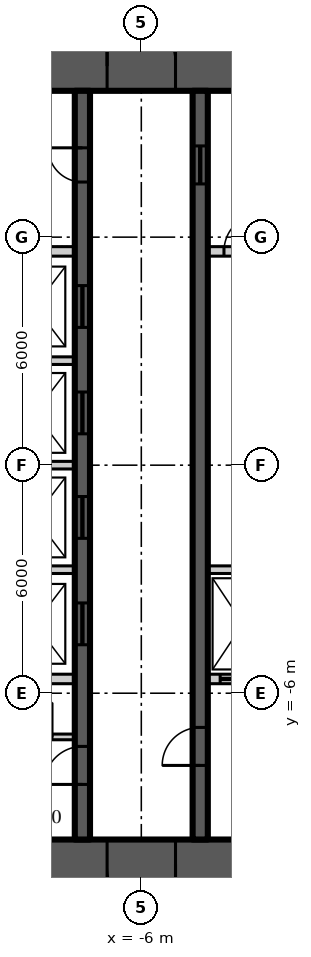
"""IFC4 building model, lengths in metres.
Left out: names, types, materials, properties, quantities, classifications, styles, units other than length and angle.
Written with IfcOpenShell. Run it as: python <this file> out.ifc"""

import sys

from ifc_helpers import new_model, si_unit, direction, frame, frame_2d, origin, place, context, subcontext, project, spatial, rectangle, extrude, element, fill, save


model = new_model("IFC4")
c1 = context("Model", 3, precision=1e-05, world=origin(), true_north=direction((0.0, 1.0)))
c2 = subcontext(c1, "Body", "Model", "MODEL_VIEW")
j1 = project(units=[si_unit("LENGTHUNIT", "METRE"), si_unit("PLANEANGLEUNIT", "RADIAN")], contexts=[c1])
p1 = place(None, origin())
s1 = spatial("IfcSite", under=j1, at=p1, CompositionType="ELEMENT")
p2 = place(p1, origin())
s2 = spatial("IfcBuilding", under=s1, at=p2, CompositionType="ELEMENT")
p3 = place(p2, frame((0.0, 0.0, 86.4)))
s3 = spatial("IfcBuildingStorey", under=s2, at=p3, CompositionType="ELEMENT", Elevation=86.4)
p4 = place(p3, frame((-11.15, 10.5, 0.0), z_axis=(0.0, 0.0, 1.0), x_axis=(1.0, 0.0, 0.0)))
e1 = element("IfcWall", 1, at=p4, inside=s3, PredefinedType="SHEAR", context=c2, shape_type="SweptSolid", body=[
    extrude(rectangle(XDim=22.3, YDim=1.3, at=frame_2d((11.15, 0.0))), origin(), (0.0, 0.0, 1.0), 3.9),
])
p5 = place(p4, frame((4.25, 0.0, 0.0)))
e2 = element("IfcOpeningElement", 2, at=p5, cuts=e1, PredefinedType="OPENING", context=c2, shape_type="SweptSolid", body=[
    extrude(rectangle(XDim=1.8, YDim=2.2, at=frame_2d((0.9, 1.1))), frame((0.0, 0.66, 0.0), z_axis=(0.0, -1.0, 0.0), x_axis=(1.0, 0.0, 0.0)), (0.0, 0.0, 1.0), 1.32),
])
p6 = place(p4, frame((16.25, 0.0, 0.0)))
e3 = element("IfcOpeningElement", 3, at=p6, cuts=e1, PredefinedType="OPENING", context=c2, shape_type="SweptSolid", body=[
    extrude(rectangle(XDim=1.8, YDim=2.2, at=frame_2d((0.9, 1.1))), frame((0.0, 0.66, 0.0), z_axis=(0.0, -1.0, 0.0), x_axis=(1.0, 0.0, 0.0)), (0.0, 0.0, 1.0), 1.32),
])
p7 = place(p3, frame((11.15, -10.5, 0.0), z_axis=(0.0, 0.0, 1.0), x_axis=(-1.0, 0.0, 0.0)))
e4 = element("IfcWall", 4, at=p7, inside=s3, PredefinedType="SHEAR", context=c2, shape_type="SweptSolid", body=[
    extrude(rectangle(XDim=22.3, YDim=1.3, at=frame_2d((11.15, 0.0))), origin(), (0.0, 0.0, 1.0), 3.9),
])
p8 = place(p7, frame((16.25, 0.0, 0.0)))
e5 = element("IfcOpeningElement", 5, at=p8, cuts=e4, PredefinedType="OPENING", context=c2, shape_type="SweptSolid", body=[
    extrude(rectangle(XDim=1.8, YDim=2.2, at=frame_2d((0.9, 1.1))), frame((0.0, 0.66, 0.0), z_axis=(0.0, -1.0, 0.0), x_axis=(1.0, 0.0, 0.0)), (0.0, 0.0, 1.0), 1.32),
])
p9 = place(p7, frame((4.25, 0.0, 0.0)))
e6 = element("IfcOpeningElement", 6, at=p9, cuts=e4, PredefinedType="OPENING", context=c2, shape_type="SweptSolid", body=[
    extrude(rectangle(XDim=1.8, YDim=2.2, at=frame_2d((0.9, 1.1))), frame((0.0, 0.66, 0.0), z_axis=(0.0, -1.0, 0.0), x_axis=(1.0, 0.0, 0.0)), (0.0, 0.0, 1.0), 1.32),
])
p10 = place(p3, frame((-7.55, -9.85, 0.0), z_axis=(0.0, 0.0, 1.0), x_axis=(0.0, 1.0, 0.0)))
e7 = element("IfcWall", 7, at=p10, inside=s3, PredefinedType="SHEAR", context=c2, shape_type="SweptSolid", body=[
    extrude(rectangle(XDim=19.7, YDim=0.4, at=frame_2d((9.85, 0.0))), origin(), (0.0, 0.0, 1.0), 3.9),
])
p11 = place(p10, frame((1.45, 0.0, 0.0)))
e8 = element("IfcOpeningElement", 8, at=p11, cuts=e7, PredefinedType="OPENING", context=c2, shape_type="SweptSolid", body=[
    extrude(rectangle(XDim=1.0, YDim=2.2, at=frame_2d((0.5, 1.1))), frame((0.0, 0.21, 0.0), z_axis=(0.0, -1.0, 0.0), x_axis=(1.0, 0.0, 0.0)), (0.0, 0.0, 1.0), 0.42),
])
p12 = place(p10, frame((17.3, 0.0, 0.0)))
e9 = element("IfcOpeningElement", 9, at=p12, cuts=e7, PredefinedType="OPENING", context=c2, shape_type="SweptSolid", body=[
    extrude(rectangle(XDim=0.9, YDim=2.1, at=frame_2d((0.45, 1.05))), frame((0.0, 0.21, 0.0), z_axis=(0.0, -1.0, 0.0), x_axis=(1.0, 0.0, 0.0)), (0.0, 0.0, 1.0), 0.42),
])
p13 = place(p10, frame((5.125, 0.0, 0.0)))
e10 = element("IfcOpeningElement", 10, at=p13, cuts=e7, PredefinedType="OPENING", context=c2, shape_type="SweptSolid", body=[
    extrude(rectangle(XDim=1.1, YDim=2.2, at=frame_2d((0.55, 1.1))), frame((0.0, 0.21, 0.0), z_axis=(0.0, -1.0, 0.0), x_axis=(1.0, 0.0, 0.0)), (0.0, 0.0, 1.0), 0.42),
])
p14 = place(p10, frame((7.925, 0.0, 0.0)))
e11 = element("IfcOpeningElement", 11, at=p14, cuts=e7, PredefinedType="OPENING", context=c2, shape_type="SweptSolid", body=[
    extrude(rectangle(XDim=1.1, YDim=2.2, at=frame_2d((0.55, 1.1))), frame((0.0, 0.21, 0.0), z_axis=(0.0, -1.0, 0.0), x_axis=(1.0, 0.0, 0.0)), (0.0, 0.0, 1.0), 0.42),
])
p15 = place(p10, frame((10.675, 0.0, 0.0)))
e12 = element("IfcOpeningElement", 12, at=p15, cuts=e7, PredefinedType="OPENING", context=c2, shape_type="SweptSolid", body=[
    extrude(rectangle(XDim=1.1, YDim=2.2, at=frame_2d((0.55, 1.1))), frame((0.0, 0.21, 0.0), z_axis=(0.0, -1.0, 0.0), x_axis=(1.0, 0.0, 0.0)), (0.0, 0.0, 1.0), 0.42),
])
p16 = place(p10, frame((13.475, 0.0, 0.0)))
e13 = element("IfcOpeningElement", 13, at=p16, cuts=e7, PredefinedType="OPENING", context=c2, shape_type="SweptSolid", body=[
    extrude(rectangle(XDim=1.1, YDim=2.2, at=frame_2d((0.55, 1.1))), frame((0.0, 0.21, 0.0), z_axis=(0.0, -1.0, 0.0), x_axis=(1.0, 0.0, 0.0)), (0.0, 0.0, 1.0), 0.42),
])
p17 = place(p3, frame((-4.45, -9.85, 0.0), z_axis=(0.0, 0.0, 1.0), x_axis=(0.0, 1.0, 0.0)))
e14 = element("IfcWall", 14, at=p17, inside=s3, PredefinedType="SHEAR", context=c2, shape_type="SweptSolid", body=[
    extrude(rectangle(XDim=19.7, YDim=0.4, at=frame_2d((9.85, 0.0))), origin(), (0.0, 0.0, 1.0), 3.9),
])
p18 = place(p17, frame((1.95, 0.0, 0.0)))
e15 = element("IfcOpeningElement", 15, at=p18, cuts=e14, PredefinedType="OPENING", context=c2, shape_type="SweptSolid", body=[
    extrude(rectangle(XDim=1.0, YDim=2.2, at=frame_2d((0.5, 1.1))), frame((0.0, 0.21, 0.0), z_axis=(0.0, -1.0, 0.0), x_axis=(1.0, 0.0, 0.0)), (0.0, 0.0, 1.0), 0.42),
])
p19 = place(p17, frame((17.25, 0.0, 0.0)))
e16 = element("IfcOpeningElement", 16, at=p19, cuts=e14, PredefinedType="OPENING", context=c2, shape_type="SweptSolid", body=[
    extrude(rectangle(XDim=1.0, YDim=2.1, at=frame_2d((0.5, 1.05))), frame((0.0, 0.21, 0.0), z_axis=(0.0, -1.0, 0.0), x_axis=(1.0, 0.0, 0.0)), (0.0, 0.0, 1.0), 0.42),
])
p20 = place(p3, frame((-9.85, 5.625, 0.0), z_axis=(0.0, 0.0, 1.0), x_axis=(1.0, 0.0, 0.0)))
e17 = element("IfcWall", 17, at=p20, inside=s3, PredefinedType="SOLIDWALL", context=c2, shape_type="SweptSolid", body=[
    extrude(rectangle(XDim=2.1, YDim=0.25, at=frame_2d((1.05, 0.0))), origin(), (0.0, 0.0, 1.0), 3.7),
])
p21 = place(p3, frame((-4.25, 5.625, 0.0), z_axis=(0.0, 0.0, 1.0), x_axis=(1.0, 0.0, 0.0)))
e18 = element("IfcWall", 18, at=p21, inside=s3, PredefinedType="SOLIDWALL", context=c2, shape_type="SweptSolid", body=[
    extrude(rectangle(XDim=1.85, YDim=0.25, at=frame_2d((0.925, 0.0))), origin(), (0.0, 0.0, 1.0), 3.7),
])
p22 = place(p21, frame((0.425, 0.0, 0.0)))
e19 = element("IfcOpeningElement", 19, at=p22, cuts=e18, PredefinedType="OPENING", context=c2, shape_type="SweptSolid", body=[
    extrude(rectangle(XDim=1.0, YDim=2.2, at=frame_2d((0.5, 1.1))), frame((0.0, 0.135, 0.0), z_axis=(0.0, -1.0, 0.0), x_axis=(1.0, 0.0, 0.0)), (0.0, 0.0, 1.0), 0.27),
])
p23 = place(p3, frame((-9.85, -5.625, 0.0), z_axis=(0.0, 0.0, 1.0), x_axis=(1.0, 0.0, 0.0)))
e20 = element("IfcWall", 20, at=p23, inside=s3, PredefinedType="SOLIDWALL", context=c2, shape_type="SweptSolid", body=[
    extrude(rectangle(XDim=2.1, YDim=0.25, at=frame_2d((1.05, 0.0))), origin(), (0.0, 0.0, 1.0), 3.7),
])
p24 = place(p3, frame((-4.25, -5.625, 0.0), z_axis=(0.0, 0.0, 1.0), x_axis=(1.0, 0.0, 0.0)))
e21 = element("IfcWall", 21, at=p24, inside=s3, PredefinedType="SOLIDWALL", context=c2, shape_type="SweptSolid", body=[
    extrude(rectangle(XDim=1.85, YDim=0.25, at=frame_2d((0.925, 0.0))), origin(), (0.0, 0.0, 1.0), 3.7),
])
p25 = place(p24, frame((0.325, 0.0, 0.0)))
e22 = element("IfcOpeningElement", 22, at=p25, cuts=e21, PredefinedType="OPENING", context=c2, shape_type="SweptSolid", body=[
    extrude(rectangle(XDim=1.2, YDim=2.2, at=frame_2d((0.6, 1.1))), frame((0.0, 0.135, 0.0), z_axis=(0.0, -1.0, 0.0), x_axis=(1.0, 0.0, 0.0)), (0.0, 0.0, 1.0), 0.27),
])
p26 = place(p3, frame((-9.85, -2.75, 0.0), z_axis=(0.0, 0.0, 1.0), x_axis=(1.0, 0.0, 0.0)))
e23 = element("IfcWall", 23, at=p26, inside=s3, PredefinedType="SOLIDWALL", context=c2, shape_type="SweptSolid", body=[
    extrude(rectangle(XDim=2.1, YDim=0.2, at=frame_2d((1.05, 0.0))), origin(), (0.0, 0.0, 1.0), 3.7),
])
p27 = place(p3, frame((-4.25, -2.75, 0.0), z_axis=(0.0, 0.0, 1.0), x_axis=(1.0, 0.0, 0.0)))
e24 = element("IfcWall", 24, at=p27, inside=s3, PredefinedType="SOLIDWALL", context=c2, shape_type="SweptSolid", body=[
    extrude(rectangle(XDim=1.85, YDim=0.2, at=frame_2d((0.925, 0.0))), origin(), (0.0, 0.0, 1.0), 3.7),
])
for number, where, z_axis, x_axis in (
    (25, (-9.85, 0.0, 0.0), (0.0, 0.0, 1.0), (1.0, 0.0, 0.0)),
    (26, (-9.85, 2.75, 0.0), (0.0, 0.0, 1.0), (1.0, 0.0, 0.0)),
):
    element("IfcWall", number, at=place(p3, frame(where, z_axis=z_axis, x_axis=x_axis)), inside=s3, PredefinedType="SOLIDWALL", context=c2, shape_type="SweptSolid", body=[
        extrude(rectangle(XDim=2.1, YDim=0.2, at=frame_2d((1.05, 0.0))), origin(), (0.0, 0.0, 1.0), 3.7),
    ])
p28 = place(p3, frame((-9.85, -7.15, 0.0), z_axis=(0.0, 0.0, 1.0), x_axis=(1.0, 0.0, 0.0)))
e27 = element("IfcWall", 27, at=p28, inside=s3, PredefinedType="SOLIDWALL", context=c2, shape_type="SweptSolid", body=[
    extrude(rectangle(XDim=2.1, YDim=0.15, at=frame_2d((1.05, 0.0))), origin(), (0.0, 0.0, 1.0), 3.77),
])
p29 = place(p28, frame((0.6, 0.0, 0.0)))
e28 = element("IfcOpeningElement", 28, at=p29, cuts=e27, PredefinedType="OPENING", context=c2, shape_type="SweptSolid", body=[
    extrude(rectangle(XDim=0.9, YDim=2.1, at=frame_2d((0.45, 1.05))), frame((0.0, 0.085, 0.0), z_axis=(0.0, -1.0, 0.0), x_axis=(1.0, 0.0, 0.0)), (0.0, 0.0, 1.0), 0.17),
])
p30 = place(p5, origin())
e29 = element("IfcDoor", 29, at=p30, inside=s3, OperationType="DOUBLE_DOOR_DOUBLE_SWING", PredefinedType="DOOR", context=c2, shape_type="SweptSolid", body=[
    extrude(rectangle(XDim=1.8, YDim=2.2, at=frame_2d((0.9, 1.1))), frame((0.0, 0.025, 0.0), z_axis=(0.0, -1.0, 0.0), x_axis=(1.0, 0.0, 0.0)), (0.0, 0.0, 1.0), 0.05),
])
fill(e2, e29)
p31 = place(p8, origin())
e30 = element("IfcDoor", 30, at=p31, inside=s3, OperationType="DOUBLE_DOOR_DOUBLE_SWING", PredefinedType="DOOR", context=c2, shape_type="SweptSolid", body=[
    extrude(rectangle(XDim=1.8, YDim=2.2, at=frame_2d((0.9, 1.1))), frame((0.0, 0.025, 0.0), z_axis=(0.0, -1.0, 0.0), x_axis=(1.0, 0.0, 0.0)), (0.0, 0.0, 1.0), 0.05),
])
fill(e5, e30)
p32 = place(p11, origin())
e31 = element("IfcDoor", 31, at=p32, inside=s3, OperationType="SINGLE_SWING_LEFT", PredefinedType="DOOR", context=c2, shape_type="SweptSolid", body=[
    extrude(rectangle(XDim=1.0, YDim=2.2, at=frame_2d((0.5, 1.1))), frame((0.0, 0.025, 0.0), z_axis=(0.0, -1.0, 0.0), x_axis=(1.0, 0.0, 0.0)), (0.0, 0.0, 1.0), 0.05),
])
fill(e8, e31)
p33 = place(p18, origin())
e32 = element("IfcDoor", 32, at=p33, inside=s3, OperationType="SINGLE_SWING_LEFT", PredefinedType="DOOR", context=c2, shape_type="SweptSolid", body=[
    extrude(rectangle(XDim=1.0, YDim=2.2, at=frame_2d((0.5, 1.1))), frame((0.0, 0.025, 0.0), z_axis=(0.0, -1.0, 0.0), x_axis=(1.0, 0.0, 0.0)), (0.0, 0.0, 1.0), 0.05),
])
fill(e15, e32)
p34 = place(p12, origin())
e33 = element("IfcDoor", 33, at=p34, inside=s3, OperationType="SINGLE_SWING_RIGHT", PredefinedType="DOOR", context=c2, shape_type="SweptSolid", body=[
    extrude(rectangle(XDim=0.9, YDim=2.1, at=frame_2d((0.45, 1.05))), frame((0.0, 0.025, 0.0), z_axis=(0.0, -1.0, 0.0), x_axis=(1.0, 0.0, 0.0)), (0.0, 0.0, 1.0), 0.05),
])
fill(e9, e33)
p35 = place(p19, origin())
e34 = element("IfcDoor", 34, at=p35, inside=s3, OperationType="SLIDING_TO_LEFT", PredefinedType="DOOR", context=c2, shape_type="SweptSolid", body=[
    extrude(rectangle(XDim=1.0, YDim=2.1, at=frame_2d((0.5, 1.05))), frame((0.0, 0.025, 0.0), z_axis=(0.0, -1.0, 0.0), x_axis=(1.0, 0.0, 0.0)), (0.0, 0.0, 1.0), 0.05),
])
fill(e16, e34)
p36 = place(p13, origin())
e35 = element("IfcDoor", 35, at=p36, inside=s3, OperationType="SLIDING_TO_LEFT", PredefinedType="DOOR", context=c2, shape_type="SweptSolid", body=[
    extrude(rectangle(XDim=1.1, YDim=2.2, at=frame_2d((0.55, 1.1))), frame((0.0, 0.025, 0.0), z_axis=(0.0, -1.0, 0.0), x_axis=(1.0, 0.0, 0.0)), (0.0, 0.0, 1.0), 0.05),
])
fill(e10, e35)
p37 = place(p14, origin())
e36 = element("IfcDoor", 36, at=p37, inside=s3, OperationType="SLIDING_TO_LEFT", PredefinedType="DOOR", context=c2, shape_type="SweptSolid", body=[
    extrude(rectangle(XDim=1.1, YDim=2.2, at=frame_2d((0.55, 1.1))), frame((0.0, 0.025, 0.0), z_axis=(0.0, -1.0, 0.0), x_axis=(1.0, 0.0, 0.0)), (0.0, 0.0, 1.0), 0.05),
])
fill(e11, e36)
p38 = place(p15, origin())
e37 = element("IfcDoor", 37, at=p38, inside=s3, OperationType="SLIDING_TO_LEFT", PredefinedType="DOOR", context=c2, shape_type="SweptSolid", body=[
    extrude(rectangle(XDim=1.1, YDim=2.2, at=frame_2d((0.55, 1.1))), frame((0.0, 0.025, 0.0), z_axis=(0.0, -1.0, 0.0), x_axis=(1.0, 0.0, 0.0)), (0.0, 0.0, 1.0), 0.05),
])
fill(e12, e37)
p39 = place(p16, origin())
e38 = element("IfcDoor", 38, at=p39, inside=s3, OperationType="SLIDING_TO_LEFT", PredefinedType="DOOR", context=c2, shape_type="SweptSolid", body=[
    extrude(rectangle(XDim=1.1, YDim=2.2, at=frame_2d((0.55, 1.1))), frame((0.0, 0.025, 0.0), z_axis=(0.0, -1.0, 0.0), x_axis=(1.0, 0.0, 0.0)), (0.0, 0.0, 1.0), 0.05),
])
fill(e13, e38)
p40 = place(p25, origin())
e39 = element("IfcDoor", 39, at=p40, inside=s3, OperationType="SLIDING_TO_LEFT", PredefinedType="DOOR", context=c2, shape_type="SweptSolid", body=[
    extrude(rectangle(XDim=1.2, YDim=2.2, at=frame_2d((0.6, 1.1))), frame((0.0, 0.025, 0.0), z_axis=(0.0, -1.0, 0.0), x_axis=(1.0, 0.0, 0.0)), (0.0, 0.0, 1.0), 0.05),
])
fill(e22, e39)
p41 = place(p22, origin())
e40 = element("IfcDoor", 40, at=p41, inside=s3, OperationType="SINGLE_SWING_RIGHT", PredefinedType="DOOR", context=c2, shape_type="SweptSolid", body=[
    extrude(rectangle(XDim=1.0, YDim=2.2, at=frame_2d((0.5, 1.1))), frame((0.0, 0.025, 0.0), z_axis=(0.0, -1.0, 0.0), x_axis=(1.0, 0.0, 0.0)), (0.0, 0.0, 1.0), 0.05),
])
fill(e19, e40)
save(model, sys.argv[1])
